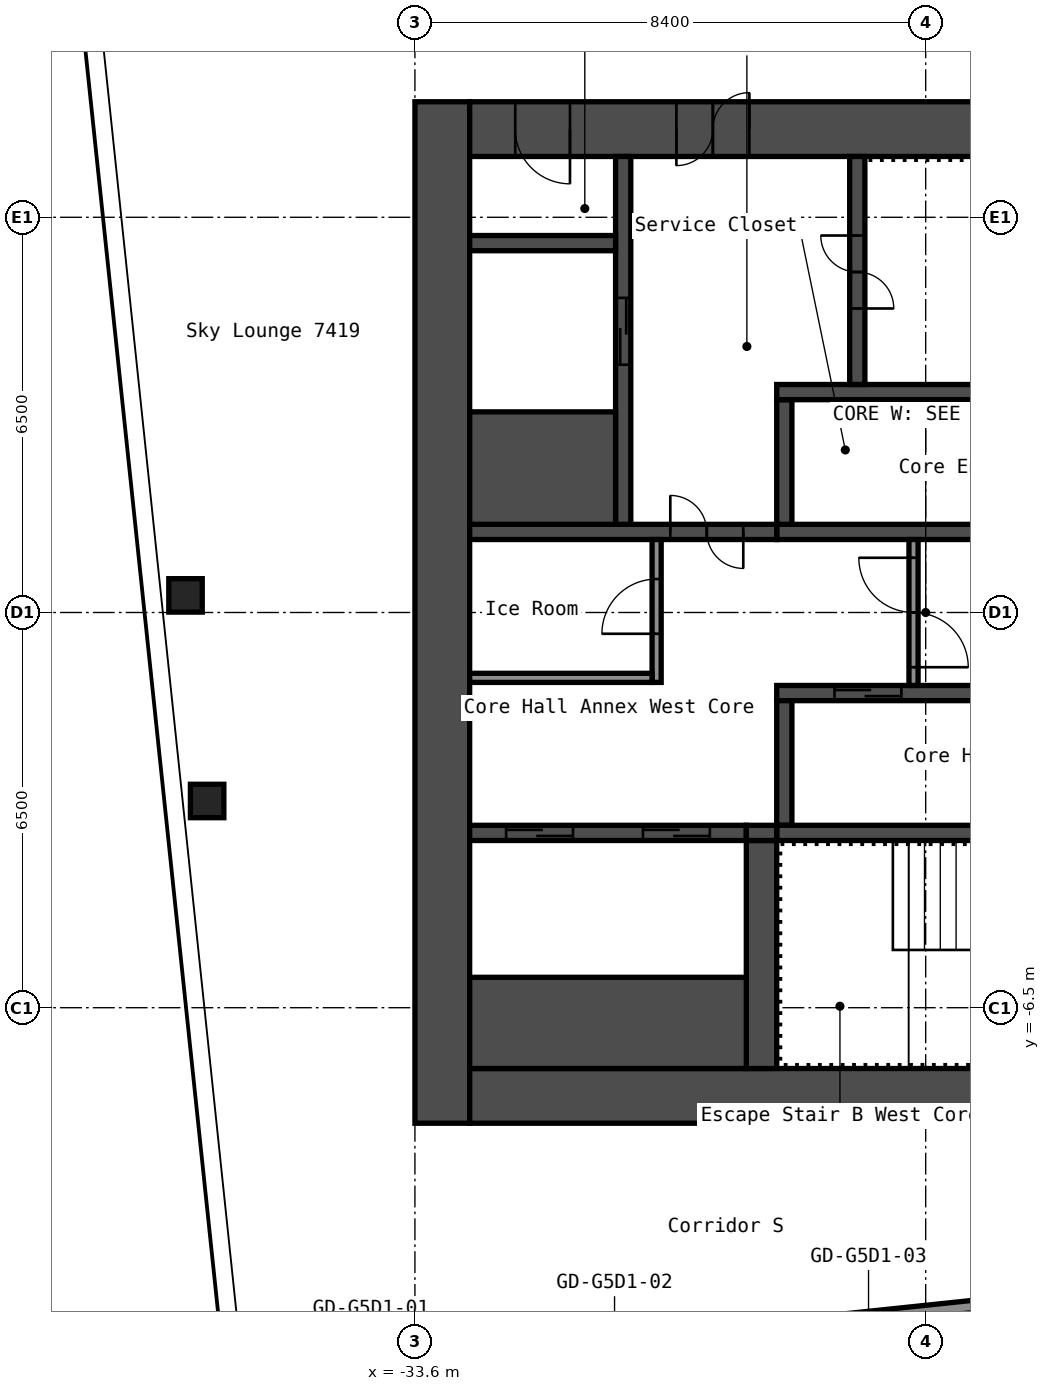
"""IFC4 building model, lengths in metres.
Left out: names, types, materials, properties, quantities, classifications, styles, units other than length and angle.
Written with IfcOpenShell. Run it as: python <this file> out.ifc"""

import sys

from ifc_helpers import new_model, si_unit, direction, frame, frame_2d, origin, origin_2d, place, context, subcontext, project, spatial, rectangle, hollow_rectangle, extrude, element, fill, save


model = new_model("IFC4")
c1 = context("Model", 3, precision=1e-05, world=origin(), true_north=direction((0.0, 1.0)))
c2 = subcontext(c1, "Body", "Model", "MODEL_VIEW")
j1 = project(units=[si_unit("LENGTHUNIT", "METRE"), si_unit("PLANEANGLEUNIT", "RADIAN")], contexts=[c1])
p1 = place(None, origin())
s1 = spatial("IfcSite", under=j1, at=p1, CompositionType="ELEMENT")
p2 = place(p1, origin())
s2 = spatial("IfcBuilding", under=s1, at=p2, CompositionType="ELEMENT")
p3 = place(p2, frame((0.0, 0.0, 261.4)))
s3 = spatial("IfcBuildingStorey", under=s2, at=p3, CompositionType="ELEMENT", Elevation=261.4)
for number, where, z_axis, x_axis in (
    (1, (-37.017, -3.1, 0.0), (0.0, 0.0, 1.0), (1.0, 0.0, 0.0)),
    (2, (-37.373, 0.281, 0.0), (0.0, 0.0, 1.0), (1.0, 0.0, 0.0)),
):
    element("IfcColumn", number, at=place(p3, frame(where, z_axis=z_axis, x_axis=x_axis)), inside=s3, PredefinedType="COLUMN", context=c2, shape_type="SweptSolid", body=[
        extrude(hollow_rectangle(XDim=0.55, YDim=0.55, WallThickness=0.022, InnerFilletRadius=0.033, OuterFilletRadius=0.055, at=origin_2d()), origin(), (0.0, 0.0, 1.0), 2.75),
    ])
p4 = place(p3, frame((-33.15, -8.4, 0.0), z_axis=(0.0, 0.0, 1.0), x_axis=(0.0, 1.0, 0.0)))
e3 = element("IfcWall", 3, at=p4, inside=s3, PredefinedType="SHEAR", context=c2, shape_type="SweptSolid", body=[
    extrude(rectangle(XDim=16.8, YDim=0.9, at=frame_2d((8.4, 0.0))), origin(), (0.0, 0.0, 1.0), 2.75),
])
p5 = place(p3, frame((-32.7, 7.95, 0.0), z_axis=(0.0, 0.0, 1.0), x_axis=(1.0, 0.0, 0.0)))
e4 = element("IfcWall", 4, at=p5, inside=s3, PredefinedType="SHEAR", context=c2, shape_type="SweptSolid", body=[
    extrude(rectangle(XDim=15.0, YDim=0.9, at=frame_2d((7.5, 0.0))), origin(), (0.0, 0.0, 1.0), 2.75),
])
p6 = place(p5, frame((3.4, 0.0, 0.0)))
e5 = element("IfcOpeningElement", 5, at=p6, cuts=e4, PredefinedType="OPENING", context=c2, shape_type="SweptSolid", body=[
    extrude(rectangle(XDim=1.2, YDim=2.1, at=frame_2d((0.6, 1.05))), frame((0.0, 0.46, 0.0), z_axis=(0.0, -1.0, 0.0), x_axis=(1.0, 0.0, 0.0)), (0.0, 0.0, 1.0), 0.92),
])
p7 = place(p5, frame((0.75, 0.0, 0.0)))
e6 = element("IfcOpeningElement", 6, at=p7, cuts=e4, PredefinedType="OPENING", context=c2, shape_type="SweptSolid", body=[
    extrude(rectangle(XDim=0.9, YDim=2.1, at=frame_2d((0.45, 1.05))), frame((0.0, 0.46, 0.0), z_axis=(0.0, -1.0, 0.0), x_axis=(1.0, 0.0, 0.0)), (0.0, 0.0, 1.0), 0.92),
])
p8 = place(p3, frame((-32.7, -7.95, 0.0), z_axis=(0.0, 0.0, 1.0), x_axis=(1.0, 0.0, 0.0)))
e7 = element("IfcWall", 7, at=p8, inside=s3, PredefinedType="SHEAR", context=c2, shape_type="SweptSolid", body=[
    extrude(rectangle(XDim=15.0, YDim=0.9, at=frame_2d((7.5, 0.0))), origin(), (0.0, 0.0, 1.0), 2.75),
])
p9 = place(p8, frame((11.45, 0.0, 0.0)))
e8 = element("IfcOpeningElement", 8, at=p9, cuts=e7, PredefinedType="OPENING", context=c2, shape_type="SweptSolid", body=[
    extrude(rectangle(XDim=1.0, YDim=2.1, at=frame_2d((0.5, 1.05))), frame((0.0, 0.46, 0.0), z_axis=(0.0, -1.0, 0.0), x_axis=(1.0, 0.0, 0.0)), (0.0, 0.0, 1.0), 0.92),
])
p10 = place(p3, frame((-27.65, 1.325, 0.0), z_axis=(0.0, 0.0, 1.0), x_axis=(1.0, 0.0, 0.0)))
e9 = element("IfcWall", 9, at=p10, inside=s3, PredefinedType="SHEAR", context=c2, shape_type="SweptSolid", body=[
    extrude(rectangle(XDim=7.5, YDim=0.25, at=frame_2d((3.75, 0.0))), origin(), (0.0, 0.0, 1.0), 2.75),
])
p11 = place(p10, frame((3.425, 0.0, 0.0)))
e10 = element("IfcOpeningElement", 10, at=p11, cuts=e9, PredefinedType="OPENING", context=c2, shape_type="SweptSolid", body=[
    extrude(rectangle(XDim=0.9, YDim=2.1, at=frame_2d((0.45, 1.05))), frame((0.0, 0.135, 0.0), z_axis=(0.0, -1.0, 0.0), x_axis=(1.0, 0.0, 0.0)), (0.0, 0.0, 1.0), 0.27),
])
p12 = place(p3, frame((-27.525, 1.45, 0.0), z_axis=(0.0, 0.0, 1.0), x_axis=(0.0, 1.0, 0.0)))
e11 = element("IfcWall", 11, at=p12, inside=s3, PredefinedType="SHEAR", context=c2, shape_type="SweptSolid", body=[
    extrude(rectangle(XDim=2.05, YDim=0.25, at=frame_2d((1.025, 0.0))), origin(), (0.0, 0.0, 1.0), 2.75),
])
p13 = place(p3, frame((-27.65, 3.625, 0.0), z_axis=(0.0, 0.0, 1.0), x_axis=(1.0, 0.0, 0.0)))
e12 = element("IfcWall", 12, at=p13, inside=s3, PredefinedType="SHEAR", context=c2, shape_type="SweptSolid", body=[
    extrude(rectangle(XDim=7.5, YDim=0.25, at=frame_2d((3.75, 0.0))), origin(), (0.0, 0.0, 1.0), 2.75),
])
p14 = place(p3, frame((-26.325, 3.75, 0.0), z_axis=(0.0, 0.0, 1.0), x_axis=(0.0, 1.0, 0.0)))
e13 = element("IfcWall", 13, at=p14, inside=s3, PredefinedType="SHEAR", context=c2, shape_type="SweptSolid", body=[
    extrude(rectangle(XDim=3.75, YDim=0.25, at=frame_2d((1.875, 0.0))), origin(), (0.0, 0.0, 1.0), 2.75),
])
p15 = place(p14, frame((1.25, 0.0, 0.0)))
e14 = element("IfcOpeningElement", 14, at=p15, cuts=e13, PredefinedType="OPENING", context=c2, shape_type="SweptSolid", body=[
    extrude(rectangle(XDim=1.2, YDim=2.1, at=frame_2d((0.6, 1.05))), frame((0.0, 0.135, 0.0), z_axis=(0.0, -1.0, 0.0), x_axis=(1.0, 0.0, 0.0)), (0.0, 0.0, 1.0), 0.27),
])
p16 = place(p3, frame((-32.7, 1.325, 0.0), z_axis=(0.0, 0.0, 1.0), x_axis=(1.0, 0.0, 0.0)))
e15 = element("IfcWall", 15, at=p16, inside=s3, PredefinedType="SHEAR", context=c2, shape_type="SweptSolid", body=[
    extrude(rectangle(XDim=5.05, YDim=0.25, at=frame_2d((2.525, 0.0))), origin(), (0.0, 0.0, 1.0), 2.75),
])
p17 = place(p16, frame((3.3, 0.0, 0.0)))
e16 = element("IfcOpeningElement", 16, at=p17, cuts=e15, PredefinedType="OPENING", context=c2, shape_type="SweptSolid", body=[
    extrude(rectangle(XDim=1.2, YDim=2.1, at=frame_2d((0.6, 1.05))), frame((0.0, 0.135, 0.0), z_axis=(0.0, -1.0, 0.0), x_axis=(1.0, 0.0, 0.0)), (0.0, 0.0, 1.0), 0.27),
])
p18 = place(p3, frame((-30.175, 1.45, 0.0), z_axis=(0.0, 0.0, 1.0), x_axis=(0.0, 1.0, 0.0)))
e17 = element("IfcWall", 17, at=p18, inside=s3, PredefinedType="SHEAR", context=c2, shape_type="SweptSolid", body=[
    extrude(rectangle(XDim=6.05, YDim=0.25, at=frame_2d((3.025, 0.0))), origin(), (0.0, 0.0, 1.0), 2.75),
])
p19 = place(p18, frame((2.625, 0.0, 0.0)))
e18 = element("IfcOpeningElement", 18, at=p19, cuts=e17, PredefinedType="OPENING", context=c2, shape_type="SweptSolid", body=[
    extrude(rectangle(XDim=1.1, YDim=2.1, at=frame_2d((0.55, 1.05))), frame((0.0, 0.135, 0.0), z_axis=(0.0, -1.0, 0.0), x_axis=(1.0, 0.0, 0.0)), (0.0, 0.0, 1.0), 0.27),
])
p20 = place(p3, frame((-32.7, 2.375, 0.0), z_axis=(0.0, 0.0, 1.0), x_axis=(1.0, 0.0, 0.0)))
e19 = element("IfcWall", 19, at=p20, inside=s3, PredefinedType="SHEAR", context=c2, shape_type="SweptSolid", body=[
    extrude(rectangle(XDim=2.4, YDim=1.85, at=frame_2d((1.2, 0.0))), origin(), (0.0, 0.0, 1.0), 2.75),
])
p21 = place(p3, frame((-32.7, 6.075, 0.0), z_axis=(0.0, 0.0, 1.0), x_axis=(1.0, 0.0, 0.0)))
e20 = element("IfcWall", 20, at=p21, inside=s3, PredefinedType="SHEAR", context=c2, shape_type="SweptSolid", body=[
    extrude(rectangle(XDim=2.4, YDim=0.25, at=frame_2d((1.2, 0.0))), origin(), (0.0, 0.0, 1.0), 2.75),
])
p22 = place(p3, frame((-27.65, -1.325, 0.0), z_axis=(0.0, 0.0, 1.0), x_axis=(1.0, 0.0, 0.0)))
e21 = element("IfcWall", 21, at=p22, inside=s3, PredefinedType="SHEAR", context=c2, shape_type="SweptSolid", body=[
    extrude(rectangle(XDim=7.5, YDim=0.25, at=frame_2d((3.75, 0.0))), origin(), (0.0, 0.0, 1.0), 2.75),
])
p23 = place(p22, frame((5.75, 0.0, 0.0)))
e22 = element("IfcOpeningElement", 22, at=p23, cuts=e21, PredefinedType="OPENING", context=c2, shape_type="SweptSolid", body=[
    extrude(rectangle(XDim=1.1, YDim=2.1, at=frame_2d((0.55, 1.05))), frame((0.0, 0.135, 0.0), z_axis=(0.0, -1.0, 0.0), x_axis=(1.0, 0.0, 0.0)), (0.0, 0.0, 1.0), 0.27),
])
p24 = place(p22, frame((3.35, 0.0, 0.0)))
e23 = element("IfcOpeningElement", 23, at=p24, cuts=e21, PredefinedType="OPENING", context=c2, shape_type="SweptSolid", body=[
    extrude(rectangle(XDim=1.1, YDim=2.1, at=frame_2d((0.55, 1.05))), frame((0.0, 0.135, 0.0), z_axis=(0.0, -1.0, 0.0), x_axis=(1.0, 0.0, 0.0)), (0.0, 0.0, 1.0), 0.27),
])
p25 = place(p22, frame((0.95, 0.0, 0.0)))
e24 = element("IfcOpeningElement", 24, at=p25, cuts=e21, PredefinedType="OPENING", context=c2, shape_type="SweptSolid", body=[
    extrude(rectangle(XDim=1.1, YDim=2.1, at=frame_2d((0.55, 1.05))), frame((0.0, 0.135, 0.0), z_axis=(0.0, -1.0, 0.0), x_axis=(1.0, 0.0, 0.0)), (0.0, 0.0, 1.0), 0.27),
])
p26 = place(p3, frame((-27.525, -3.5, 0.0), z_axis=(0.0, 0.0, 1.0), x_axis=(0.0, 1.0, 0.0)))
e25 = element("IfcWall", 25, at=p26, inside=s3, PredefinedType="SHEAR", context=c2, shape_type="SweptSolid", body=[
    extrude(rectangle(XDim=2.05, YDim=0.25, at=frame_2d((1.025, 0.0))), origin(), (0.0, 0.0, 1.0), 2.75),
])
p27 = place(p3, frame((-27.65, -3.625, 0.0), z_axis=(0.0, 0.0, 1.0), x_axis=(1.0, 0.0, 0.0)))
e26 = element("IfcWall", 26, at=p27, inside=s3, PredefinedType="SHEAR", context=c2, shape_type="SweptSolid", body=[
    extrude(rectangle(XDim=7.5, YDim=0.25, at=frame_2d((3.75, 0.0))), origin(), (0.0, 0.0, 1.0), 2.75),
])
p28 = place(p3, frame((-27.9, -7.5, 0.0), z_axis=(0.0, 0.0, 1.0), x_axis=(0.0, 1.0, 0.0)))
e27 = element("IfcWall", 27, at=p28, inside=s3, PredefinedType="SHEAR", context=c2, shape_type="SweptSolid", body=[
    extrude(rectangle(XDim=3.75, YDim=0.5, at=frame_2d((1.875, 0.0))), origin(), (0.0, 0.0, 1.0), 2.75),
])
p29 = place(p3, frame((-32.7, -3.625, 0.0), z_axis=(0.0, 0.0, 1.0), x_axis=(1.0, 0.0, 0.0)))
e28 = element("IfcWall", 28, at=p29, inside=s3, PredefinedType="SHEAR", context=c2, shape_type="SweptSolid", body=[
    extrude(rectangle(XDim=4.55, YDim=0.25, at=frame_2d((2.275, 0.0))), origin(), (0.0, 0.0, 1.0), 2.75),
])
p30 = place(p29, frame((2.85, 0.0, 0.0)))
e29 = element("IfcOpeningElement", 29, at=p30, cuts=e28, PredefinedType="OPENING", context=c2, shape_type="SweptSolid", body=[
    extrude(rectangle(XDim=1.1, YDim=2.1, at=frame_2d((0.55, 1.05))), frame((0.0, 0.135, 0.0), z_axis=(0.0, -1.0, 0.0), x_axis=(1.0, 0.0, 0.0)), (0.0, 0.0, 1.0), 0.27),
])
p31 = place(p29, frame((0.6, 0.0, 0.0)))
e30 = element("IfcOpeningElement", 30, at=p31, cuts=e28, PredefinedType="OPENING", context=c2, shape_type="SweptSolid", body=[
    extrude(rectangle(XDim=1.1, YDim=2.1, at=frame_2d((0.55, 1.05))), frame((0.0, 0.135, 0.0), z_axis=(0.0, -1.0, 0.0), x_axis=(1.0, 0.0, 0.0)), (0.0, 0.0, 1.0), 0.27),
])
p32 = place(p3, frame((-32.7, -6.75, 0.0), z_axis=(0.0, 0.0, 1.0), x_axis=(1.0, 0.0, 0.0)))
e31 = element("IfcWall", 31, at=p32, inside=s3, PredefinedType="SHEAR", context=c2, shape_type="SweptSolid", body=[
    extrude(rectangle(XDim=4.55, YDim=1.5, at=frame_2d((2.275, 0.0))), origin(), (0.0, 0.0, 1.0), 2.75),
])
p33 = place(p3, frame((-28.15, -3.625, 0.0), z_axis=(0.0, 0.0, 1.0), x_axis=(1.0, 0.0, 0.0)))
e32 = element("IfcWall", 32, at=p33, inside=s3, PredefinedType="SHEAR", context=c2, shape_type="SweptSolid", body=[
    extrude(rectangle(XDim=0.5, YDim=0.25, at=frame_2d((0.25, 0.0))), origin(), (0.0, 0.0, 1.0), 2.75),
])
p34 = place(p3, frame((-25.4, -1.2, 0.0), z_axis=(0.0, 0.0, 1.0), x_axis=(0.0, 1.0, 0.0)))
e33 = element("IfcWall", 33, at=p34, inside=s3, PredefinedType="PARTITIONING", context=c2, shape_type="SweptSolid", body=[
    extrude(rectangle(XDim=2.4, YDim=0.15, at=frame_2d((1.2, 0.0))), origin(), (0.0, 0.0, 1.0), 2.75),
])
p35 = place(p34, frame((0.3, 0.0, 0.0)))
e34 = element("IfcOpeningElement", 34, at=p35, cuts=e33, PredefinedType="OPENING", context=c2, shape_type="SweptSolid", body=[
    extrude(rectangle(XDim=1.8, YDim=2.1, at=frame_2d((0.9, 1.05))), frame((0.0, 0.085, 0.0), z_axis=(0.0, -1.0, 0.0), x_axis=(1.0, 0.0, 0.0)), (0.0, 0.0, 1.0), 0.17),
])
p36 = place(p3, frame((-29.625, -1.15, 0.0), z_axis=(0.0, 0.0, 1.0), x_axis=(0.0, 1.0, 0.0)))
e35 = element("IfcWall", 35, at=p36, inside=s3, PredefinedType="PARTITIONING", context=c2, shape_type="SweptSolid", body=[
    extrude(rectangle(XDim=2.35, YDim=0.15, at=frame_2d((1.175, 0.0))), origin(), (0.0, 0.0, 1.0), 2.75),
])
p37 = place(p36, frame((0.8, 0.0, 0.0)))
e36 = element("IfcOpeningElement", 36, at=p37, cuts=e35, PredefinedType="OPENING", context=c2, shape_type="SweptSolid", body=[
    extrude(rectangle(XDim=0.9, YDim=2.1, at=frame_2d((0.45, 1.05))), frame((0.0, 0.085, 0.0), z_axis=(0.0, -1.0, 0.0), x_axis=(1.0, 0.0, 0.0)), (0.0, 0.0, 1.0), 0.17),
])
p38 = place(p3, frame((-32.7, -1.075, 0.0), z_axis=(0.0, 0.0, 1.0), x_axis=(1.0, 0.0, 0.0)))
e37 = element("IfcWall", 37, at=p38, inside=s3, PredefinedType="PARTITIONING", context=c2, shape_type="SweptSolid", body=[
    extrude(rectangle(XDim=3.0, YDim=0.15, at=frame_2d((1.5, 0.0))), origin(), (0.0, 0.0, 1.0), 2.75),
])
p39 = place(p3, frame((-36.712, -12.705, 0.0), z_axis=(0.0, 0.0, 1.0), x_axis=(0.994522460242, 0.104523088709, 0.0)))
e38 = element("IfcWall", 38, at=p39, inside=s3, PredefinedType="PARTITIONING", context=c2, shape_type="SweptSolid", body=[
    extrude(rectangle(XDim=21.3, YDim=0.2, at=frame_2d((10.65, 0.0))), origin(), (0.0, 0.0, 1.0), 2.75),
])
p40 = place(p39, frame((1.95, 0.0, 0.0)))
e39 = element("IfcOpeningElement", 39, at=p40, cuts=e38, PredefinedType="OPENING", context=c2, shape_type="SweptSolid", body=[
    extrude(rectangle(XDim=0.9, YDim=2.1, at=frame_2d((0.45, 1.05))), frame((0.0, 0.11, 0.0), z_axis=(0.0, -1.0, 0.0), x_axis=(1.0, 0.0, 0.0)), (0.0, 0.0, 1.0), 0.22),
])
p41 = place(p39, frame((5.98, 0.0, 0.0)))
e40 = element("IfcOpeningElement", 40, at=p41, cuts=e38, PredefinedType="OPENING", context=c2, shape_type="SweptSolid", body=[
    extrude(rectangle(XDim=0.9, YDim=2.1, at=frame_2d((0.45, 1.05))), frame((0.0, 0.11, 0.0), z_axis=(0.0, -1.0, 0.0), x_axis=(1.0, 0.0, 0.0)), (0.0, 0.0, 1.0), 0.22),
])
p42 = place(p39, frame((10.18, 0.0, 0.0)))
e41 = element("IfcOpeningElement", 41, at=p42, cuts=e38, PredefinedType="OPENING", context=c2, shape_type="SweptSolid", body=[
    extrude(rectangle(XDim=0.9, YDim=2.1, at=frame_2d((0.45, 1.05))), frame((0.0, 0.11, 0.0), z_axis=(0.0, -1.0, 0.0), x_axis=(1.0, 0.0, 0.0)), (0.0, 0.0, 1.0), 0.22),
])
p43 = place(p39, frame((14.3, 0.0, 0.0)))
e42 = element("IfcOpeningElement", 42, at=p43, cuts=e38, PredefinedType="OPENING", context=c2, shape_type="SweptSolid", body=[
    extrude(rectangle(XDim=0.9, YDim=2.1, at=frame_2d((0.45, 1.05))), frame((0.0, 0.11, 0.0), z_axis=(0.0, -1.0, 0.0), x_axis=(1.0, 0.0, 0.0)), (0.0, 0.0, 1.0), 0.22),
])
p44 = place(p39, frame((18.5, 0.0, 0.0)))
e43 = element("IfcOpeningElement", 43, at=p44, cuts=e38, PredefinedType="OPENING", context=c2, shape_type="SweptSolid", body=[
    extrude(rectangle(XDim=0.9, YDim=2.1, at=frame_2d((0.45, 1.05))), frame((0.0, 0.11, 0.0), z_axis=(0.0, -1.0, 0.0), x_axis=(1.0, 0.0, 0.0)), (0.0, 0.0, 1.0), 0.22),
])
p45 = place(p6, origin())
e44 = element("IfcDoor", 44, at=p45, inside=s3, OperationType="DOUBLE_DOOR_SINGLE_SWING", PredefinedType="DOOR", context=c2, shape_type="SweptSolid", body=[
    extrude(rectangle(XDim=1.2, YDim=2.1, at=frame_2d((0.6, 1.05))), frame((0.0, 0.025, 0.0), z_axis=(0.0, -1.0, 0.0), x_axis=(1.0, 0.0, 0.0)), (0.0, 0.0, 1.0), 0.05),
])
fill(e5, e44)
p46 = place(p7, origin())
e45 = element("IfcDoor", 45, at=p46, inside=s3, OperationType="SINGLE_SWING_RIGHT", PredefinedType="DOOR", context=c2, shape_type="SweptSolid", body=[
    extrude(rectangle(XDim=0.9, YDim=2.1, at=frame_2d((0.45, 1.05))), frame((0.0, 0.025, 0.0), z_axis=(0.0, -1.0, 0.0), x_axis=(1.0, 0.0, 0.0)), (0.0, 0.0, 1.0), 0.05),
])
fill(e6, e45)
p47 = place(p15, origin())
e46 = element("IfcDoor", 46, at=p47, inside=s3, OperationType="DOUBLE_DOOR_SINGLE_SWING", PredefinedType="DOOR", context=c2, shape_type="SweptSolid", body=[
    extrude(rectangle(XDim=1.2, YDim=2.1, at=frame_2d((0.6, 1.05))), frame((0.0, 0.025, 0.0), z_axis=(0.0, -1.0, 0.0), x_axis=(1.0, 0.0, 0.0)), (0.0, 0.0, 1.0), 0.05),
])
fill(e14, e46)
p48 = place(p17, origin())
e47 = element("IfcDoor", 47, at=p48, inside=s3, OperationType="DOUBLE_DOOR_SINGLE_SWING", PredefinedType="DOOR", context=c2, shape_type="SweptSolid", body=[
    extrude(rectangle(XDim=1.2, YDim=2.1, at=frame_2d((0.6, 1.05))), frame((0.0, 0.025, 0.0), z_axis=(0.0, -1.0, 0.0), x_axis=(1.0, 0.0, 0.0)), (0.0, 0.0, 1.0), 0.05),
])
fill(e16, e47)
p49 = place(p35, origin())
e48 = element("IfcDoor", 48, at=p49, inside=s3, OperationType="DOUBLE_DOOR_SINGLE_SWING", PredefinedType="DOOR", context=c2, shape_type="SweptSolid", body=[
    extrude(rectangle(XDim=1.8, YDim=2.1, at=frame_2d((0.9, 1.05))), frame((0.0, 0.025, 0.0), z_axis=(0.0, -1.0, 0.0), x_axis=(1.0, 0.0, 0.0)), (0.0, 0.0, 1.0), 0.05),
])
fill(e34, e48)
p50 = place(p37, origin())
e49 = element("IfcDoor", 49, at=p50, inside=s3, OperationType="SINGLE_SWING_RIGHT", PredefinedType="DOOR", context=c2, shape_type="SweptSolid", body=[
    extrude(rectangle(XDim=0.9, YDim=2.1, at=frame_2d((0.45, 1.05))), frame((0.0, 0.025, 0.0), z_axis=(0.0, -1.0, 0.0), x_axis=(1.0, 0.0, 0.0)), (0.0, 0.0, 1.0), 0.05),
])
fill(e36, e49)
p51 = place(p25, origin())
e50 = element("IfcDoor", 50, at=p51, inside=s3, OperationType="DOUBLE_DOOR_SLIDING", PredefinedType="DOOR", context=c2, shape_type="SweptSolid", body=[
    extrude(rectangle(XDim=1.1, YDim=2.1, at=frame_2d((0.55, 1.05))), frame((0.0, 0.025, 0.0), z_axis=(0.0, -1.0, 0.0), x_axis=(1.0, 0.0, 0.0)), (0.0, 0.0, 1.0), 0.05),
])
fill(e24, e50)
p52 = place(p19, origin())
e51 = element("IfcDoor", 51, at=p52, inside=s3, OperationType="DOUBLE_DOOR_SLIDING", PredefinedType="DOOR", context=c2, shape_type="SweptSolid", body=[
    extrude(rectangle(XDim=1.1, YDim=2.1, at=frame_2d((0.55, 1.05))), frame((0.0, 0.025, 0.0), z_axis=(0.0, -1.0, 0.0), x_axis=(1.0, 0.0, 0.0)), (0.0, 0.0, 1.0), 0.05),
])
fill(e18, e51)
p53 = place(p30, origin())
e52 = element("IfcDoor", 52, at=p53, inside=s3, OperationType="DOUBLE_DOOR_SLIDING", PredefinedType="DOOR", context=c2, shape_type="SweptSolid", body=[
    extrude(rectangle(XDim=1.1, YDim=2.1, at=frame_2d((0.55, 1.05))), frame((0.0, 0.025, 0.0), z_axis=(0.0, -1.0, 0.0), x_axis=(1.0, 0.0, 0.0)), (0.0, 0.0, 1.0), 0.05),
])
fill(e29, e52)
p54 = place(p31, origin())
e53 = element("IfcDoor", 53, at=p54, inside=s3, OperationType="DOUBLE_DOOR_SLIDING", PredefinedType="DOOR", context=c2, shape_type="SweptSolid", body=[
    extrude(rectangle(XDim=1.1, YDim=2.1, at=frame_2d((0.55, 1.05))), frame((0.0, 0.025, 0.0), z_axis=(0.0, -1.0, 0.0), x_axis=(1.0, 0.0, 0.0)), (0.0, 0.0, 1.0), 0.05),
])
fill(e30, e53)
save(model, sys.argv[1])
